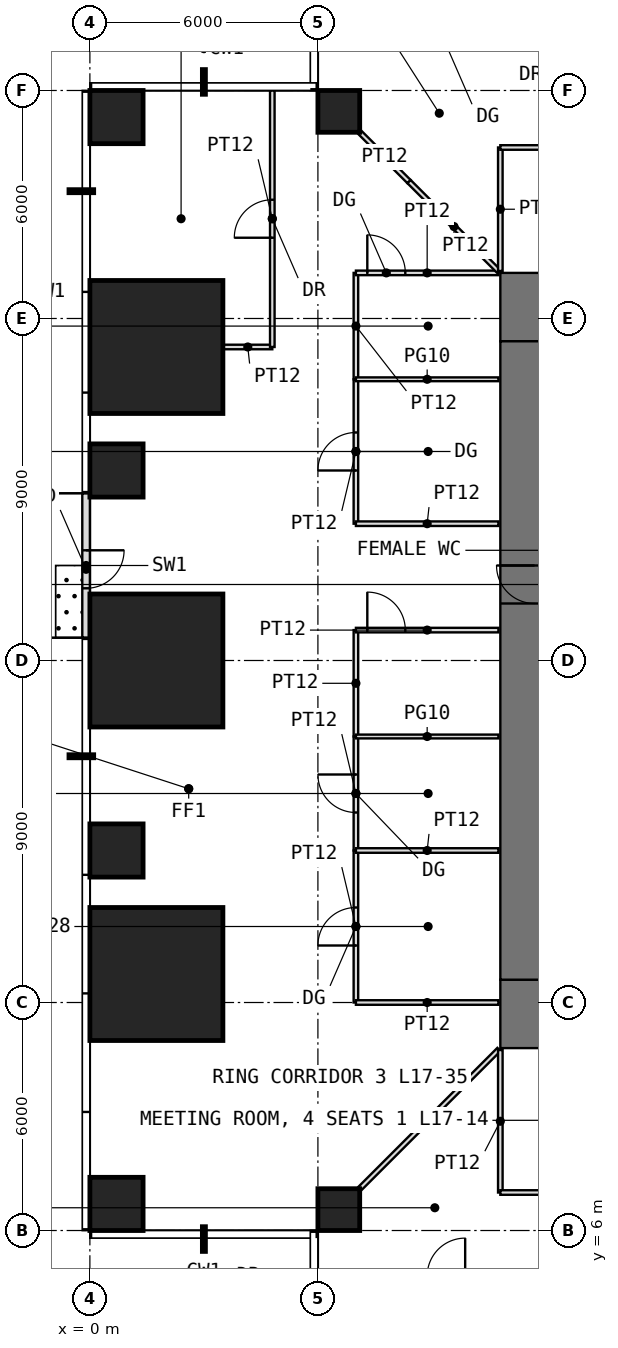
"""IFC4 building model, lengths in metres.
Left out: names, types, materials, properties, quantities, classifications, styles, units other than length and angle.
Written with IfcOpenShell. Run it as: python <this file> out.ifc"""

import sys

from ifc_helpers import new_model, si_unit, direction, frame, frame_2d, origin, origin_2d, place, context, subcontext, project, spatial, rectangle, extrude, element, fill, save


model = new_model("IFC4")
c1 = context("Model", 3, precision=1e-05, world=origin(), true_north=direction((0.0, 1.0)))
c2 = subcontext(c1, "Body", "Model", "MODEL_VIEW")
j1 = project(units=[si_unit("LENGTHUNIT", "METRE"), si_unit("PLANEANGLEUNIT", "RADIAN")], contexts=[c1])
p1 = place(None, origin())
s1 = spatial("IfcSite", under=j1, at=p1, CompositionType="ELEMENT")
p2 = place(p1, origin())
s2 = spatial("IfcBuilding", under=s1, at=p2, CompositionType="ELEMENT")
p3 = place(p2, frame((0.0, 0.0, 74.5)))
s3 = spatial("IfcBuildingStorey", under=s2, at=p3, CompositionType="ELEMENT", Elevation=74.5)
p4 = place(p3, frame((0.7, 6.7, 0.0), z_axis=(0.0, 0.0, 1.0), x_axis=(1.0, 0.0, 0.0)))
e1 = element("IfcColumn", 1, at=p4, inside=s3, PredefinedType="COLUMN", context=c2, shape_type="SweptSolid", body=[
    extrude(rectangle(XDim=1.4, YDim=1.4, at=origin_2d()), origin(), (0.0, 0.0, 1.0), 4.0),
])
p5 = place(p3, frame((6.55, 6.55, 0.0), z_axis=(0.0, 0.0, 1.0), x_axis=(1.0, 0.0, 0.0)))
e2 = element("IfcColumn", 2, at=p5, inside=s3, PredefinedType="COLUMN", context=c2, shape_type="SweptSolid", body=[
    extrude(rectangle(XDim=1.1, YDim=1.1, at=origin_2d()), origin(), (0.0, 0.0, 1.0), 4.0),
])
p6 = place(p3, frame((1.75, 12.75, 0.0), z_axis=(0.0, 0.0, 1.0), x_axis=(1.0, 0.0, 0.0)))
e3 = element("IfcColumn", 3, at=p6, inside=s3, PredefinedType="COLUMN", context=c2, shape_type="SweptSolid", body=[
    extrude(rectangle(XDim=3.5, YDim=3.5, at=origin_2d()), origin(), (0.0, 0.0, 1.0), 4.0),
])
p7 = place(p3, frame((0.7, 16.0, 0.0), z_axis=(0.0, 0.0, 1.0), x_axis=(1.0, 0.0, 0.0)))
e4 = element("IfcColumn", 4, at=p7, inside=s3, PredefinedType="COLUMN", context=c2, shape_type="SweptSolid", body=[
    extrude(rectangle(XDim=1.4, YDim=1.4, at=origin_2d()), origin(), (0.0, 0.0, 1.0), 4.0),
])
p8 = place(p3, frame((1.75, 21.0, 0.0), z_axis=(0.0, 0.0, 1.0), x_axis=(1.0, 0.0, 0.0)))
e5 = element("IfcColumn", 5, at=p8, inside=s3, PredefinedType="COLUMN", context=c2, shape_type="SweptSolid", body=[
    extrude(rectangle(XDim=3.5, YDim=3.5, at=origin_2d()), origin(), (0.0, 0.0, 1.0), 4.0),
])
p9 = place(p3, frame((0.7, 26.0, 0.0), z_axis=(0.0, 0.0, 1.0), x_axis=(1.0, 0.0, 0.0)))
e6 = element("IfcColumn", 6, at=p9, inside=s3, PredefinedType="COLUMN", context=c2, shape_type="SweptSolid", body=[
    extrude(rectangle(XDim=1.4, YDim=1.4, at=origin_2d()), origin(), (0.0, 0.0, 1.0), 4.0),
])
p10 = place(p3, frame((1.75, 29.25, 0.0), z_axis=(0.0, 0.0, 1.0), x_axis=(1.0, 0.0, 0.0)))
e7 = element("IfcColumn", 7, at=p10, inside=s3, PredefinedType="COLUMN", context=c2, shape_type="SweptSolid", body=[
    extrude(rectangle(XDim=3.5, YDim=3.5, at=origin_2d()), origin(), (0.0, 0.0, 1.0), 4.0),
])
p11 = place(p3, frame((0.7, 35.3, 0.0), z_axis=(0.0, 0.0, 1.0), x_axis=(1.0, 0.0, 0.0)))
e8 = element("IfcColumn", 8, at=p11, inside=s3, PredefinedType="COLUMN", context=c2, shape_type="SweptSolid", body=[
    extrude(rectangle(XDim=1.4, YDim=1.4, at=origin_2d()), origin(), (0.0, 0.0, 1.0), 4.0),
])
p12 = place(p3, frame((6.55, 35.45, 0.0), z_axis=(0.0, 0.0, 1.0), x_axis=(1.0, 0.0, 0.0)))
e9 = element("IfcColumn", 9, at=p12, inside=s3, PredefinedType="COLUMN", context=c2, shape_type="SweptSolid", body=[
    extrude(rectangle(XDim=1.1, YDim=1.1, at=origin_2d()), origin(), (0.0, 0.0, 1.0), 4.0),
])
p13 = place(p3, frame((-0.1, 25.4, 0.0), z_axis=(0.0, 0.0, 1.0), x_axis=(0.0, -1.0, 0.0)))
e10 = element("IfcWall", 10, at=p13, inside=s3, PredefinedType="USERDEFINED", context=c2, shape_type="SweptSolid", body=[
    extrude(rectangle(XDim=3.8, YDim=0.2, at=frame_2d((1.9, 0.0))), origin(), (0.0, 0.0, 1.0), 3.75),
])
p14 = place(p13, frame((1.5, 0.0, 0.0)))
e11 = element("IfcOpeningElement", 11, at=p14, cuts=e10, PredefinedType="OPENING", context=c2, shape_type="SweptSolid", body=[
    extrude(rectangle(XDim=1.0, YDim=2.4, at=frame_2d((0.5, 1.2))), frame((0.0, 0.11, 0.0), z_axis=(0.0, -1.0, 0.0), x_axis=(1.0, 0.0, 0.0)), (0.0, 0.0, 1.0), 0.22),
])
p15 = place(p3, frame((10.8, 11.7, -0.05), z_axis=(0.0, 0.0, 1.0), x_axis=(1.0, 0.0, 0.0)))
e12 = element("IfcWall", 12, at=p15, inside=s3, PredefinedType="SHEAR", context=c2, shape_type="SweptSolid", body=[
    extrude(rectangle(XDim=20.4, YDim=1.8, at=frame_2d((10.2, 0.0))), origin(), (0.0, 0.0, 1.0), 4.0),
])
p16 = place(p15, frame((9.2, 0.0, 0.05)))
e13 = element("IfcOpeningElement", 13, at=p16, cuts=e12, PredefinedType="OPENING", context=c2, shape_type="SweptSolid", body=[
    extrude(rectangle(XDim=2.0, YDim=2.2, at=frame_2d((1.0, 1.1))), frame((0.0, 0.91, 0.0), z_axis=(0.0, -1.0, 0.0), x_axis=(1.0, 0.0, 0.0)), (0.0, 0.0, 1.0), 1.82),
])
p17 = place(p3, frame((10.8, 30.3, -0.05), z_axis=(0.0, 0.0, 1.0), x_axis=(1.0, 0.0, 0.0)))
e14 = element("IfcWall", 14, at=p17, inside=s3, PredefinedType="SHEAR", context=c2, shape_type="SweptSolid", body=[
    extrude(rectangle(XDim=20.4, YDim=1.8, at=frame_2d((10.2, 0.0))), origin(), (0.0, 0.0, 1.0), 4.0),
])
p18 = place(p17, frame((9.2, 0.0, 0.05)))
e15 = element("IfcOpeningElement", 15, at=p18, cuts=e14, PredefinedType="OPENING", context=c2, shape_type="SweptSolid", body=[
    extrude(rectangle(XDim=2.0, YDim=2.2, at=frame_2d((1.0, 1.1))), frame((0.0, 0.91, 0.0), z_axis=(0.0, -1.0, 0.0), x_axis=(1.0, 0.0, 0.0)), (0.0, 0.0, 1.0), 1.82),
])
p19 = place(p3, frame((11.7, 12.6, -0.05), z_axis=(0.0, 0.0, 1.0), x_axis=(0.0, 1.0, 0.0)))
e16 = element("IfcWall", 16, at=p19, inside=s3, PredefinedType="SHEAR", context=c2, shape_type="SweptSolid", body=[
    extrude(rectangle(XDim=16.8, YDim=1.8, at=frame_2d((8.4, 0.0))), origin(), (0.0, 0.0, 1.0), 4.0),
])
p20 = place(p19, frame((9.9, 0.0, 0.05)))
e17 = element("IfcOpeningElement", 17, at=p20, cuts=e16, PredefinedType="OPENING", context=c2, shape_type="SweptSolid", body=[
    extrude(rectangle(XDim=1.0, YDim=2.2, at=frame_2d((0.5, 1.1))), frame((0.0, 0.91, 0.0), z_axis=(0.0, -1.0, 0.0), x_axis=(1.0, 0.0, 0.0)), (0.0, 0.0, 1.0), 1.82),
])
p21 = place(p3, frame((3.51, 29.25, 0.0), z_axis=(0.0, 0.0, 1.0), x_axis=(1.0, 0.0, 0.0)))
e18 = element("IfcWall", 18, at=p21, inside=s3, PredefinedType="PARTITIONING", context=c2, shape_type="SweptSolid", body=[
    extrude(rectangle(XDim=1.29, YDim=0.12, at=frame_2d((0.645, 0.0))), origin(), (0.0, 0.0, 1.0), 3.75),
])
p22 = place(p3, frame((4.8, 29.25, 0.0), z_axis=(0.0, 0.0, 1.0), x_axis=(0.0, 1.0, 0.0)))
e19 = element("IfcWall", 19, at=p22, inside=s3, PredefinedType="PARTITIONING", context=c2, shape_type="SweptSolid", body=[
    extrude(rectangle(XDim=6.75, YDim=0.12, at=frame_2d((3.375, 0.0))), origin(), (0.0, 0.0, 1.0), 3.75),
])
p23 = place(p22, frame((2.875, 0.0, 0.0)))
e20 = element("IfcOpeningElement", 20, at=p23, cuts=e19, PredefinedType="OPENING", context=c2, shape_type="SweptSolid", body=[
    extrude(rectangle(XDim=1.0, YDim=2.2, at=frame_2d((0.5, 1.1))), frame((0.0, 0.07, 0.0), z_axis=(0.0, -1.0, 0.0), x_axis=(1.0, 0.0, 0.0)), (0.0, 0.0, 1.0), 0.14),
])
p24 = place(p3, frame((7.0, 12.0, 0.0), z_axis=(0.0, 0.0, 1.0), x_axis=(0.0, 1.0, 0.0)))
e21 = element("IfcWall", 21, at=p24, inside=s3, PredefinedType="PARTITIONING", context=c2, shape_type="SweptSolid", body=[
    extrude(rectangle(XDim=4.0, YDim=0.12, at=frame_2d((2.0, 0.0))), origin(), (0.0, 0.0, 1.0), 3.75),
])
p25 = place(p24, frame((1.5, 0.0, 0.0)))
e22 = element("IfcOpeningElement", 22, at=p25, cuts=e21, PredefinedType="OPENING", context=c2, shape_type="SweptSolid", body=[
    extrude(rectangle(XDim=1.0, YDim=2.4, at=frame_2d((0.5, 1.2))), frame((0.0, 0.07, 0.0), z_axis=(0.0, -1.0, 0.0), x_axis=(1.0, 0.0, 0.0)), (0.0, 0.0, 1.0), 0.14),
])
p26 = place(p3, frame((7.0, 12.0, 0.0), z_axis=(0.0, 0.0, 1.0), x_axis=(1.0, 0.0, 0.0)))
e23 = element("IfcWall", 23, at=p26, inside=s3, PredefinedType="PARTITIONING", context=c2, shape_type="SweptSolid", body=[
    extrude(rectangle(XDim=3.75, YDim=0.12, at=frame_2d((1.875, 0.0))), origin(), (0.0, 0.0, 1.0), 3.75),
])
p27 = place(p3, frame((7.0, 16.0, 0.0), z_axis=(0.0, 0.0, 1.0), x_axis=(0.0, 1.0, 0.0)))
e24 = element("IfcWall", 24, at=p27, inside=s3, PredefinedType="PARTITIONING", context=c2, shape_type="SweptSolid", body=[
    extrude(rectangle(XDim=3.0, YDim=0.12, at=frame_2d((1.5, 0.0))), origin(), (0.0, 0.0, 1.0), 3.75),
])
p28 = place(p27, frame((1.0, 0.0, 0.0)))
e25 = element("IfcOpeningElement", 25, at=p28, cuts=e24, PredefinedType="OPENING", context=c2, shape_type="SweptSolid", body=[
    extrude(rectangle(XDim=1.0, YDim=2.4, at=frame_2d((0.5, 1.2))), frame((0.0, 0.07, 0.0), z_axis=(0.0, -1.0, 0.0), x_axis=(1.0, 0.0, 0.0)), (0.0, 0.0, 1.0), 0.14),
])
p29 = place(p3, frame((7.0, 16.0, 0.0), z_axis=(0.0, 0.0, 1.0), x_axis=(1.0, 0.0, 0.0)))
e26 = element("IfcWall", 26, at=p29, inside=s3, PredefinedType="PARTITIONING", context=c2, shape_type="SweptSolid", body=[
    extrude(rectangle(XDim=3.75, YDim=0.12, at=frame_2d((1.875, 0.0))), origin(), (0.0, 0.0, 1.0), 3.75),
])
p30 = place(p3, frame((7.0, 19.0, 0.0), z_axis=(0.0, 0.0, 1.0), x_axis=(0.0, 1.0, 0.0)))
e27 = element("IfcWall", 27, at=p30, inside=s3, PredefinedType="PARTITIONING", context=c2, shape_type="SweptSolid", body=[
    extrude(rectangle(XDim=2.8, YDim=0.12, at=frame_2d((1.4, 0.0))), origin(), (0.0, 0.0, 1.0), 3.75),
])
p31 = place(p3, frame((7.0, 19.0, 0.0), z_axis=(0.0, 0.0, 1.0), x_axis=(1.0, 0.0, 0.0)))
e28 = element("IfcWall", 28, at=p31, inside=s3, PredefinedType="PARTITIONING", context=c2, shape_type="SweptSolid", body=[
    extrude(rectangle(XDim=3.75, YDim=0.1, at=frame_2d((1.875, 0.0))), origin(), (0.0, 0.0, 1.0), 3.75),
])
p32 = place(p3, frame((7.0, 21.8, 0.0), z_axis=(0.0, 0.0, 1.0), x_axis=(1.0, 0.0, 0.0)))
e29 = element("IfcWall", 29, at=p32, inside=s3, PredefinedType="PARTITIONING", context=c2, shape_type="SweptSolid", body=[
    extrude(rectangle(XDim=3.75, YDim=0.12, at=frame_2d((1.875, 0.0))), origin(), (0.0, 0.0, 1.0), 3.75),
])
p33 = place(p32, frame((0.3, 0.0, 0.0)))
e30 = element("IfcOpeningElement", 30, at=p33, cuts=e29, PredefinedType="OPENING", context=c2, shape_type="SweptSolid", body=[
    extrude(rectangle(XDim=1.0, YDim=2.4, at=frame_2d((0.5, 1.2))), frame((0.0, 0.07, 0.0), z_axis=(0.0, -1.0, 0.0), x_axis=(1.0, 0.0, 0.0)), (0.0, 0.0, 1.0), 0.14),
])
p34 = place(p3, frame((7.0, 24.6, 0.0), z_axis=(0.0, 0.0, 1.0), x_axis=(0.0, 1.0, 0.0)))
e31 = element("IfcWall", 31, at=p34, inside=s3, PredefinedType="PARTITIONING", context=c2, shape_type="SweptSolid", body=[
    extrude(rectangle(XDim=3.8, YDim=0.12, at=frame_2d((1.9, 0.0))), origin(), (0.0, 0.0, 1.0), 3.75),
])
p35 = place(p34, frame((1.4, 0.0, 0.0)))
e32 = element("IfcOpeningElement", 32, at=p35, cuts=e31, PredefinedType="OPENING", context=c2, shape_type="SweptSolid", body=[
    extrude(rectangle(XDim=1.0, YDim=2.4, at=frame_2d((0.5, 1.2))), frame((0.0, 0.07, 0.0), z_axis=(0.0, -1.0, 0.0), x_axis=(1.0, 0.0, 0.0)), (0.0, 0.0, 1.0), 0.14),
])
p36 = place(p3, frame((7.0, 24.6, 0.0), z_axis=(0.0, 0.0, 1.0), x_axis=(1.0, 0.0, 0.0)))
e33 = element("IfcWall", 33, at=p36, inside=s3, PredefinedType="PARTITIONING", context=c2, shape_type="SweptSolid", body=[
    extrude(rectangle(XDim=3.75, YDim=0.12, at=frame_2d((1.875, 0.0))), origin(), (0.0, 0.0, 1.0), 3.75),
])
p37 = place(p3, frame((7.0, 28.4, 0.0), z_axis=(0.0, 0.0, 1.0), x_axis=(0.0, 1.0, 0.0)))
e34 = element("IfcWall", 34, at=p37, inside=s3, PredefinedType="PARTITIONING", context=c2, shape_type="SweptSolid", body=[
    extrude(rectangle(XDim=2.8, YDim=0.12, at=frame_2d((1.4, 0.0))), origin(), (0.0, 0.0, 1.0), 3.75),
])
p38 = place(p3, frame((7.0, 28.4, 0.0), z_axis=(0.0, 0.0, 1.0), x_axis=(1.0, 0.0, 0.0)))
e35 = element("IfcWall", 35, at=p38, inside=s3, PredefinedType="PARTITIONING", context=c2, shape_type="SweptSolid", body=[
    extrude(rectangle(XDim=3.75, YDim=0.1, at=frame_2d((1.875, 0.0))), origin(), (0.0, 0.0, 1.0), 3.75),
])
p39 = place(p3, frame((7.0, 31.2, 0.0), z_axis=(0.0, 0.0, 1.0), x_axis=(1.0, 0.0, 0.0)))
e36 = element("IfcWall", 36, at=p39, inside=s3, PredefinedType="PARTITIONING", context=c2, shape_type="SweptSolid", body=[
    extrude(rectangle(XDim=3.75, YDim=0.12, at=frame_2d((1.875, 0.0))), origin(), (0.0, 0.0, 1.0), 3.75),
])
p40 = place(p39, frame((0.3, 0.0, 0.0)))
e37 = element("IfcOpeningElement", 37, at=p40, cuts=e36, PredefinedType="OPENING", context=c2, shape_type="SweptSolid", body=[
    extrude(rectangle(XDim=1.0, YDim=2.4, at=frame_2d((0.5, 1.2))), frame((0.0, 0.07, 0.0), z_axis=(0.0, -1.0, 0.0), x_axis=(1.0, 0.0, 0.0)), (0.0, 0.0, 1.0), 0.14),
])
p41 = place(p3, frame((7.11, 7.11, 0.0), z_axis=(0.0, 0.0, 1.0), x_axis=(0.707106781187, 0.707106781187, 0.0)))
e38 = element("IfcWall", 38, at=p41, inside=s3, PredefinedType="PARTITIONING", context=c2, shape_type="SweptSolid", body=[
    extrude(rectangle(XDim=5.168, YDim=0.12, at=frame_2d((2.584, 0.0))), origin(), (0.0, 0.0, 1.0), 3.75),
])
p42 = place(p3, frame((7.11, 34.89, 0.0), z_axis=(0.0, 0.0, 1.0), x_axis=(0.707106781187, -0.707106781187, 0.0)))
e39 = element("IfcWall", 39, at=p42, inside=s3, PredefinedType="PARTITIONING", context=c2, shape_type="SweptSolid", body=[
    extrude(rectangle(XDim=1.822, YDim=0.12, at=frame_2d((0.911, 0.0))), origin(), (0.0, 0.0, 1.0), 3.75),
])
p43 = place(p3, frame((8.398, 33.602, 0.0), z_axis=(0.0, 0.0, 1.0), x_axis=(0.707106781187, -0.707106781187, 0.0)))
e40 = element("IfcWall", 40, at=p43, inside=s3, PredefinedType="PARTITIONING", context=c2, shape_type="SweptSolid", body=[
    extrude(rectangle(XDim=3.346, YDim=0.12, at=frame_2d((1.673, 0.0))), origin(), (0.0, 0.0, 1.0), 3.75),
])
p44 = place(p3, frame((10.8, 7.0, 0.0), z_axis=(0.0, 0.0, 1.0), x_axis=(0.0, 1.0, 0.0)))
e41 = element("IfcWall", 41, at=p44, inside=s3, PredefinedType="PARTITIONING", context=c2, shape_type="SweptSolid", body=[
    extrude(rectangle(XDim=3.75, YDim=0.12, at=frame_2d((1.875, 0.0))), origin(), (0.0, 0.0, 1.0), 3.75),
])
p45 = place(p3, frame((10.8, 7.0, 0.0), z_axis=(0.0, 0.0, 1.0), x_axis=(1.0, 0.0, 0.0)))
e42 = element("IfcWall", 42, at=p45, inside=s3, PredefinedType="PARTITIONING", context=c2, shape_type="SweptSolid", body=[
    extrude(rectangle(XDim=3.8, YDim=0.12, at=frame_2d((1.9, 0.0))), origin(), (0.0, 0.0, 1.0), 3.75),
])
p46 = place(p45, frame((1.4, 0.0, 0.0)))
e43 = element("IfcOpeningElement", 43, at=p46, cuts=e42, PredefinedType="OPENING", context=c2, shape_type="SweptSolid", body=[
    extrude(rectangle(XDim=1.0, YDim=2.4, at=frame_2d((0.5, 1.2))), frame((0.0, 0.07, 0.0), z_axis=(0.0, -1.0, 0.0), x_axis=(1.0, 0.0, 0.0)), (0.0, 0.0, 1.0), 0.14),
])
p47 = place(p3, frame((10.8, 31.25, 0.0), z_axis=(0.0, 0.0, 1.0), x_axis=(0.0, 1.0, 0.0)))
e44 = element("IfcWall", 44, at=p47, inside=s3, PredefinedType="PARTITIONING", context=c2, shape_type="SweptSolid", body=[
    extrude(rectangle(XDim=3.25, YDim=0.12, at=frame_2d((1.625, 0.0))), origin(), (0.0, 0.0, 1.0), 3.75),
])
p48 = place(p3, frame((10.8, 34.5, 0.0), z_axis=(0.0, 0.0, 1.0), x_axis=(1.0, 0.0, 0.0)))
e45 = element("IfcWall", 45, at=p48, inside=s3, PredefinedType="PARTITIONING", context=c2, shape_type="SweptSolid", body=[
    extrude(rectangle(XDim=3.8, YDim=0.12, at=frame_2d((1.9, 0.0))), origin(), (0.0, 0.0, 1.0), 3.75),
])
p49 = place(p48, frame((1.4, 0.0, 0.0)))
e46 = element("IfcOpeningElement", 46, at=p49, cuts=e45, PredefinedType="OPENING", context=c2, shape_type="SweptSolid", body=[
    extrude(rectangle(XDim=1.0, YDim=2.2, at=frame_2d((0.5, 1.1))), frame((0.0, 0.07, 0.0), z_axis=(0.0, -1.0, 0.0), x_axis=(1.0, 0.0, 0.0)), (0.0, 0.0, 1.0), 0.14),
])
p50 = place(p14, origin())
e47 = element("IfcDoor", 47, at=p50, inside=s3, OperationType="SINGLE_SWING_LEFT", PredefinedType="DOOR", context=c2, shape_type="SweptSolid", body=[
    extrude(rectangle(XDim=1.0, YDim=2.4, at=frame_2d((0.5, 1.2))), frame((0.0, 0.025, 0.0), z_axis=(0.0, -1.0, 0.0), x_axis=(1.0, 0.0, 0.0)), (0.0, 0.0, 1.0), 0.05),
])
fill(e11, e47)
p51 = place(p20, origin())
e48 = element("IfcDoor", 48, at=p51, inside=s3, OperationType="SINGLE_SWING_RIGHT", PredefinedType="DOOR", context=c2, shape_type="SweptSolid", body=[
    extrude(rectangle(XDim=1.0, YDim=2.2, at=frame_2d((0.5, 1.1))), frame((0.0, 0.025, 0.0), z_axis=(0.0, -1.0, 0.0), x_axis=(1.0, 0.0, 0.0)), (0.0, 0.0, 1.0), 0.05),
])
fill(e17, e48)
p52 = place(p25, origin())
e49 = element("IfcDoor", 49, at=p52, inside=s3, OperationType="SINGLE_SWING_LEFT", PredefinedType="DOOR", context=c2, shape_type="SweptSolid", body=[
    extrude(rectangle(XDim=1.0, YDim=2.4, at=frame_2d((0.5, 1.2))), frame((0.0, 0.025, 0.0), z_axis=(0.0, -1.0, 0.0), x_axis=(1.0, 0.0, 0.0)), (0.0, 0.0, 1.0), 0.05),
])
fill(e22, e49)
p53 = place(p28, origin())
e50 = element("IfcDoor", 50, at=p53, inside=s3, OperationType="SINGLE_SWING_RIGHT", PredefinedType="DOOR", context=c2, shape_type="SweptSolid", body=[
    extrude(rectangle(XDim=1.0, YDim=2.4, at=frame_2d((0.5, 1.2))), frame((0.0, 0.025, 0.0), z_axis=(0.0, -1.0, 0.0), x_axis=(1.0, 0.0, 0.0)), (0.0, 0.0, 1.0), 0.05),
])
fill(e25, e50)
p54 = place(p35, origin())
e51 = element("IfcDoor", 51, at=p54, inside=s3, OperationType="SINGLE_SWING_LEFT", PredefinedType="DOOR", context=c2, shape_type="SweptSolid", body=[
    extrude(rectangle(XDim=1.0, YDim=2.4, at=frame_2d((0.5, 1.2))), frame((0.0, 0.025, 0.0), z_axis=(0.0, -1.0, 0.0), x_axis=(1.0, 0.0, 0.0)), (0.0, 0.0, 1.0), 0.05),
])
fill(e32, e51)
p55 = place(p23, origin())
e52 = element("IfcDoor", 52, at=p55, inside=s3, OperationType="SINGLE_SWING_LEFT", PredefinedType="DOOR", context=c2, shape_type="SweptSolid", body=[
    extrude(rectangle(XDim=1.0, YDim=2.2, at=frame_2d((0.5, 1.1))), frame((0.0, 0.025, 0.0), z_axis=(0.0, -1.0, 0.0), x_axis=(1.0, 0.0, 0.0)), (0.0, 0.0, 1.0), 0.05),
])
fill(e20, e52)
p56 = place(p40, origin())
e53 = element("IfcDoor", 53, at=p56, inside=s3, OperationType="SINGLE_SWING_LEFT", PredefinedType="DOOR", context=c2, shape_type="SweptSolid", body=[
    extrude(rectangle(XDim=1.0, YDim=2.4, at=frame_2d((0.5, 1.2))), frame((0.0, 0.025, 0.0), z_axis=(0.0, -1.0, 0.0), x_axis=(1.0, 0.0, 0.0)), (0.0, 0.0, 1.0), 0.05),
])
fill(e37, e53)
p57 = place(p33, origin())
e54 = element("IfcDoor", 54, at=p57, inside=s3, OperationType="SINGLE_SWING_LEFT", PredefinedType="DOOR", context=c2, shape_type="SweptSolid", body=[
    extrude(rectangle(XDim=1.0, YDim=2.4, at=frame_2d((0.5, 1.2))), frame((0.0, 0.025, 0.0), z_axis=(0.0, -1.0, 0.0), x_axis=(1.0, 0.0, 0.0)), (0.0, 0.0, 1.0), 0.05),
])
fill(e30, e54)
save(model, sys.argv[1])
